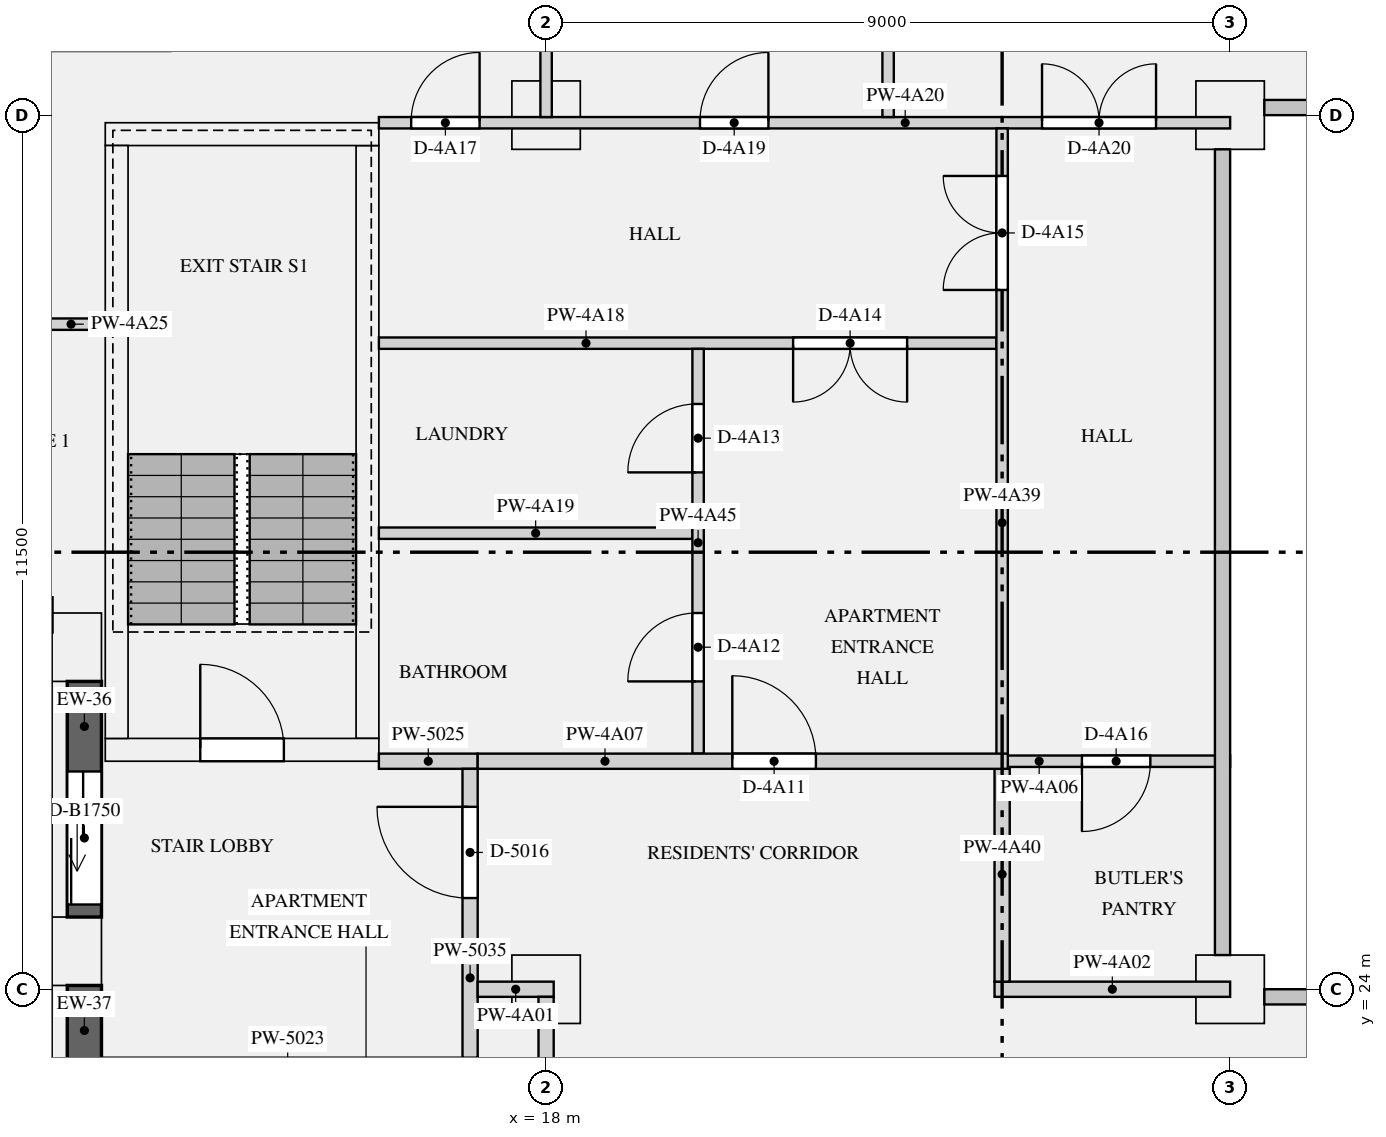
"""IFC4 building model, lengths in metres.
Left out: names, types, materials, properties, quantities, classifications, styles, units other than length and angle.
Written with IfcOpenShell. Run it as: python <this file> out.ifc"""

import sys

from ifc_helpers import new_model, si_unit, direction, frame, frame_2d, origin, origin_2d, place, context, subcontext, project, spatial, rectangle, extrude, element, fill, save


model = new_model("IFC4")
c1 = context("Model", 3, precision=1e-05, world=origin(), true_north=direction((0.0, 1.0)))
c2 = subcontext(c1, "Body", "Model", "MODEL_VIEW")
j1 = project(units=[si_unit("LENGTHUNIT", "METRE"), si_unit("PLANEANGLEUNIT", "RADIAN")], contexts=[c1])
p1 = place(None, origin())
s1 = spatial("IfcSite", under=j1, at=p1, CompositionType="ELEMENT")
p2 = place(p1, origin())
s2 = spatial("IfcBuilding", under=s1, at=p2, CompositionType="ELEMENT")
p3 = place(p2, frame((0.0, 0.0, 198.0)))
s3 = spatial("IfcBuildingStorey", under=s2, at=p3, CompositionType="ELEMENT", Elevation=198.0)
for number, where, z_axis, x_axis in (
    (1, (11.825, 28.5, 0.0), (0.0, 0.0, 1.0), (0.0, -1.0, 0.0)),
    (2, (11.825, 24.5, 0.0), (0.0, 0.0, 1.0), (0.0, -1.0, 0.0)),
):
    element("IfcColumn", number, at=place(p3, frame(where, z_axis=z_axis, x_axis=x_axis)), inside=s3, PredefinedType="USERDEFINED", context=c2, shape_type="SweptSolid", body=[
        extrude(rectangle(XDim=0.9, YDim=0.65, at=origin_2d()), origin(), (0.0, 0.0, 1.0), 3.15),
    ])
for number, where, z_axis, x_axis in (
    (3, (18.0, 24.0, 0.0), (0.0, 0.0, 1.0), (1.0, 0.0, 0.0)),
    (4, (27.0, 24.0, 0.0), (0.0, 0.0, 1.0), (1.0, 0.0, 0.0)),
    (5, (18.0, 35.5, 0.0), (0.0, 0.0, 1.0), (1.0, 0.0, 0.0)),
    (6, (27.0, 35.5, 0.0), (0.0, 0.0, 1.0), (1.0, 0.0, 0.0)),
):
    element("IfcColumn", number, at=place(p3, frame(where, z_axis=z_axis, x_axis=x_axis)), inside=s3, PredefinedType="COLUMN", context=c2, shape_type="SweptSolid", body=[
        extrude(rectangle(XDim=0.9, YDim=0.9, at=origin_2d()), origin(), (0.0, 0.0, 1.0), 3.15),
    ])
p4 = place(p3, frame((12.2, 27.15, 0.0), z_axis=(0.0, 0.0, 1.0), x_axis=(1.0, 0.0, 0.0)))
e7 = element("IfcWall", 7, at=p4, inside=s3, PredefinedType="SHEAR", context=c2, shape_type="SweptSolid", body=[
    extrude(rectangle(XDim=3.6, YDim=0.3, at=frame_2d((1.8, 0.0))), origin(), (0.0, 0.0, 1.0), 3.15),
])
p5 = place(p4, frame((1.25, 0.0, 0.0)))
e8 = element("IfcOpeningElement", 8, at=p5, cuts=e7, PredefinedType="OPENING", context=c2, shape_type="SweptSolid", body=[
    extrude(rectangle(XDim=1.1, YDim=2.1, at=frame_2d((0.55, 1.05))), frame((0.0, 0.16, 0.0), z_axis=(0.0, -1.0, 0.0), x_axis=(1.0, 0.0, 0.0)), (0.0, 0.0, 1.0), 0.32),
])
p6 = place(p3, frame((12.2, 35.25, 0.0), z_axis=(0.0, 0.0, 1.0), x_axis=(1.0, 0.0, 0.0)))
e9 = element("IfcWall", 9, at=p6, inside=s3, PredefinedType="SHEAR", context=c2, shape_type="SweptSolid", body=[
    extrude(rectangle(XDim=3.6, YDim=0.3, at=frame_2d((1.8, 0.0))), origin(), (0.0, 0.0, 1.0), 3.15),
])
for number, where, z_axis, x_axis in (
    (10, (12.35, 27.3, 0.0), (0.0, 0.0, 1.0), (0.0, 1.0, 0.0)),
    (11, (15.65, 27.3, 0.0), (0.0, 0.0, 1.0), (0.0, 1.0, 0.0)),
):
    element("IfcWall", number, at=place(p3, frame(where, z_axis=z_axis, x_axis=x_axis)), inside=s3, PredefinedType="SHEAR", context=c2, shape_type="SweptSolid", body=[
        extrude(rectangle(XDim=7.8, YDim=0.3, at=frame_2d((3.9, 0.0))), origin(), (0.0, 0.0, 1.0), 3.15),
    ])
p7 = place(p3, frame((11.925, 28.05, 0.0), z_axis=(0.0, 0.0, 1.0), x_axis=(0.0, -1.0, 0.0)))
e12 = element("IfcWall", 12, at=p7, inside=s3, PredefinedType="SOLIDWALL", context=c2, shape_type="SweptSolid", body=[
    extrude(rectangle(XDim=3.1, YDim=0.45, at=frame_2d((1.55, 0.0))), origin(), (0.0, 0.0, 1.0), 2.83),
])
p8 = place(p7, frame((1.185, 0.0, 0.0)))
e13 = element("IfcOpeningElement", 13, at=p8, cuts=e12, PredefinedType="OPENING", context=c2, shape_type="SweptSolid", body=[
    extrude(rectangle(XDim=1.75, YDim=2.3, at=frame_2d((0.875, 1.15))), frame((0.0, 0.235, 0.0), z_axis=(0.0, -1.0, 0.0), x_axis=(1.0, 0.0, 0.0)), (0.0, 0.0, 1.0), 0.47),
])
p9 = place(p3, frame((11.925, 24.05, 0.0), z_axis=(0.0, 0.0, 1.0), x_axis=(0.0, -1.0, 0.0)))
e14 = element("IfcWall", 14, at=p9, inside=s3, PredefinedType="SOLIDWALL", context=c2, shape_type="SweptSolid", body=[
    extrude(rectangle(XDim=3.1, YDim=0.45, at=frame_2d((1.55, 0.0))), origin(), (0.0, 0.0, 1.0), 2.83),
])
p10 = place(p9, frame((1.185, 0.0, 0.0)))
e15 = element("IfcOpeningElement", 15, at=p10, cuts=e14, PredefinedType="OPENING", context=c2, shape_type="SweptSolid", body=[
    extrude(rectangle(XDim=1.75, YDim=2.3, at=frame_2d((0.875, 1.15))), frame((0.0, 0.235, 0.0), z_axis=(0.0, -1.0, 0.0), x_axis=(1.0, 0.0, 0.0)), (0.0, 0.0, 1.0), 0.47),
])
p11 = place(p3, frame((15.8, 27.0, 0.0), z_axis=(0.0, 0.0, 1.0), x_axis=(1.0, 0.0, 0.0)))
e16 = element("IfcWall", 16, at=p11, inside=s3, PredefinedType="PARTITIONING", context=c2, shape_type="SweptSolid", body=[
    extrude(rectangle(XDim=1.3, YDim=0.2, at=frame_2d((0.65, 0.0))), origin(), (0.0, 0.0, 1.0), 2.83),
])
p12 = place(p3, frame((17.0, 23.1, 0.0), z_axis=(0.0, 0.0, 1.0), x_axis=(0.0, 1.0, 0.0)))
e17 = element("IfcWall", 17, at=p12, inside=s3, PredefinedType="PARTITIONING", context=c2, shape_type="SweptSolid", body=[
    extrude(rectangle(XDim=3.8, YDim=0.2, at=frame_2d((1.9, 0.0))), origin(), (0.0, 0.0, 1.0), 2.83),
])
p13 = place(p12, frame((2.1, 0.0, 0.0)))
e18 = element("IfcOpeningElement", 18, at=p13, cuts=e17, PredefinedType="OPENING", context=c2, shape_type="SweptSolid", body=[
    extrude(rectangle(XDim=1.2, YDim=2.1, at=frame_2d((0.6, 1.05))), frame((0.0, 0.11, 0.0), z_axis=(0.0, -1.0, 0.0), x_axis=(1.0, 0.0, 0.0)), (0.0, 0.0, 1.0), 0.22),
])
p14 = place(p3, frame((17.1, 24.0, 0.0), z_axis=(0.0, 0.0, 1.0), x_axis=(1.0, 0.0, 0.0)))
e19 = element("IfcWall", 19, at=p14, inside=s3, PredefinedType="PARTITIONING", context=c2, shape_type="SweptSolid", body=[
    extrude(rectangle(XDim=1.0, YDim=0.2, at=frame_2d((0.5, 0.0))), origin(), (0.0, 0.0, 1.0), 2.83),
])
p15 = place(p3, frame((23.9, 24.0, 0.0), z_axis=(0.0, 0.0, 1.0), x_axis=(1.0, 0.0, 0.0)))
e20 = element("IfcWall", 20, at=p15, inside=s3, PredefinedType="PARTITIONING", context=c2, shape_type="SweptSolid", body=[
    extrude(rectangle(XDim=3.1, YDim=0.2, at=frame_2d((1.55, 0.0))), origin(), (0.0, 0.0, 1.0), 2.83),
])
p16 = place(p3, frame((23.925, 27.0, 0.0), z_axis=(0.0, 0.0, 1.0), x_axis=(1.0, 0.0, 0.0)))
e21 = element("IfcWall", 21, at=p16, inside=s3, PredefinedType="PARTITIONING", context=c2, shape_type="SweptSolid", body=[
    extrude(rectangle(XDim=3.075, YDim=0.15, at=frame_2d((1.538, 0.0))), origin(), (0.0, 0.0, 1.0), 2.83),
])
p17 = place(p16, frame((1.125, 0.0, 0.0)))
e22 = element("IfcOpeningElement", 22, at=p17, cuts=e21, PredefinedType="OPENING", context=c2, shape_type="SweptSolid", body=[
    extrude(rectangle(XDim=0.9, YDim=2.1, at=frame_2d((0.45, 1.05))), frame((0.0, 0.085, 0.0), z_axis=(0.0, -1.0, 0.0), x_axis=(1.0, 0.0, 0.0)), (0.0, 0.0, 1.0), 0.17),
])
p18 = place(p3, frame((17.1, 27.0, 0.0), z_axis=(0.0, 0.0, 1.0), x_axis=(1.0, 0.0, 0.0)))
e23 = element("IfcWall", 23, at=p18, inside=s3, PredefinedType="PARTITIONING", context=c2, shape_type="SweptSolid", body=[
    extrude(rectangle(XDim=6.975, YDim=0.2, at=frame_2d((3.487, 0.0))), origin(), (0.0, 0.0, 1.0), 2.83),
])
p19 = place(p18, frame((3.35, 0.0, 0.0)))
e24 = element("IfcOpeningElement", 24, at=p19, cuts=e23, PredefinedType="OPENING", context=c2, shape_type="SweptSolid", body=[
    extrude(rectangle(XDim=1.1, YDim=2.1, at=frame_2d((0.55, 1.05))), frame((0.0, 0.11, 0.0), z_axis=(0.0, -1.0, 0.0), x_axis=(1.0, 0.0, 0.0)), (0.0, 0.0, 1.0), 0.22),
])
p20 = place(p3, frame((15.8, 32.5, 0.0), z_axis=(0.0, 0.0, 1.0), x_axis=(1.0, 0.0, 0.0)))
e25 = element("IfcWall", 25, at=p20, inside=s3, PredefinedType="PARTITIONING", context=c2, shape_type="SweptSolid", body=[
    extrude(rectangle(XDim=8.125, YDim=0.15, at=frame_2d((4.062, 0.0))), origin(), (0.0, 0.0, 1.0), 2.83),
])
p21 = place(p20, frame((5.45, 0.0, 0.0)))
e26 = element("IfcOpeningElement", 26, at=p21, cuts=e25, PredefinedType="OPENING", context=c2, shape_type="SweptSolid", body=[
    extrude(rectangle(XDim=1.5, YDim=2.1, at=frame_2d((0.75, 1.05))), frame((0.0, 0.085, 0.0), z_axis=(0.0, -1.0, 0.0), x_axis=(1.0, 0.0, 0.0)), (0.0, 0.0, 1.0), 0.17),
])
p22 = place(p3, frame((15.8, 30.0, 0.0), z_axis=(0.0, 0.0, 1.0), x_axis=(1.0, 0.0, 0.0)))
e27 = element("IfcWall", 27, at=p22, inside=s3, PredefinedType="PARTITIONING", context=c2, shape_type="SweptSolid", body=[
    extrude(rectangle(XDim=4.125, YDim=0.15, at=frame_2d((2.062, 0.0))), origin(), (0.0, 0.0, 1.0), 2.83),
])
p23 = place(p3, frame((15.8, 35.4, 0.0), z_axis=(0.0, 0.0, 1.0), x_axis=(1.0, 0.0, 0.0)))
e28 = element("IfcWall", 28, at=p23, inside=s3, PredefinedType="PARTITIONING", context=c2, shape_type="SweptSolid", body=[
    extrude(rectangle(XDim=11.2, YDim=0.15, at=frame_2d((5.6, 0.0))), origin(), (0.0, 0.0, 1.0), 2.83),
])
p24 = place(p23, frame((0.425, 0.0, 0.0)))
e29 = element("IfcOpeningElement", 29, at=p24, cuts=e28, PredefinedType="OPENING", context=c2, shape_type="SweptSolid", body=[
    extrude(rectangle(XDim=0.9, YDim=2.1, at=frame_2d((0.45, 1.05))), frame((0.0, 0.085, 0.0), z_axis=(0.0, -1.0, 0.0), x_axis=(1.0, 0.0, 0.0)), (0.0, 0.0, 1.0), 0.17),
])
p25 = place(p23, frame((4.225, 0.0, 0.0)))
e30 = element("IfcOpeningElement", 30, at=p25, cuts=e28, PredefinedType="OPENING", context=c2, shape_type="SweptSolid", body=[
    extrude(rectangle(XDim=0.9, YDim=2.1, at=frame_2d((0.45, 1.05))), frame((0.0, 0.085, 0.0), z_axis=(0.0, -1.0, 0.0), x_axis=(1.0, 0.0, 0.0)), (0.0, 0.0, 1.0), 0.17),
])
p26 = place(p23, frame((8.725, 0.0, 0.0)))
e31 = element("IfcOpeningElement", 31, at=p26, cuts=e28, PredefinedType="OPENING", context=c2, shape_type="SweptSolid", body=[
    extrude(rectangle(XDim=1.5, YDim=2.1, at=frame_2d((0.75, 1.05))), frame((0.0, 0.085, 0.0), z_axis=(0.0, -1.0, 0.0), x_axis=(1.0, 0.0, 0.0)), (0.0, 0.0, 1.0), 0.17),
])
p27 = place(p3, frame((9.65, 32.75, 0.0), z_axis=(0.0, 0.0, 1.0), x_axis=(1.0, 0.0, 0.0)))
e32 = element("IfcWall", 32, at=p27, inside=s3, PredefinedType="PARTITIONING", context=c2, shape_type="SweptSolid", body=[
    extrude(rectangle(XDim=2.55, YDim=0.15, at=frame_2d((1.275, 0.0))), origin(), (0.0, 0.0, 1.0), 2.83),
])
p28 = place(p27, frame((0.75, 0.0, 0.0)))
e33 = element("IfcOpeningElement", 33, at=p28, cuts=e32, PredefinedType="OPENING", context=c2, shape_type="SweptSolid", body=[
    extrude(rectangle(XDim=0.9, YDim=2.1, at=frame_2d((0.45, 1.05))), frame((0.0, 0.085, 0.0), z_axis=(0.0, -1.0, 0.0), x_axis=(1.0, 0.0, 0.0)), (0.0, 0.0, 1.0), 0.17),
])
p29 = place(p3, frame((18.0, 35.475, 0.0), z_axis=(0.0, 0.0, 1.0), x_axis=(0.0, 1.0, 0.0)))
e34 = element("IfcWall", 34, at=p29, inside=s3, PredefinedType="PARTITIONING", context=c2, shape_type="SweptSolid", body=[
    extrude(rectangle(XDim=5.375, YDim=0.15, at=frame_2d((2.688, 0.0))), origin(), (0.0, 0.0, 1.0), 2.83),
])
p30 = place(p3, frame((18.0, 16.1, 0.0), z_axis=(0.0, 0.0, 1.0), x_axis=(0.0, 1.0, 0.0)))
e35 = element("IfcWall", 35, at=p30, inside=s3, PredefinedType="PARTITIONING", context=c2, shape_type="SweptSolid", body=[
    extrude(rectangle(XDim=7.8, YDim=0.2, at=frame_2d((3.9, 0.0))), origin(), (0.0, 0.0, 1.0), 2.83),
])
p31 = place(p30, frame((5.35, 0.0, 0.0)))
e36 = element("IfcOpeningElement", 36, at=p31, cuts=e35, PredefinedType="OPENING", context=c2, shape_type="SweptSolid", body=[
    extrude(rectangle(XDim=1.1, YDim=2.1, at=frame_2d((0.55, 1.05))), frame((0.0, 0.11, 0.0), z_axis=(0.0, -1.0, 0.0), x_axis=(1.0, 0.0, 0.0)), (0.0, 0.0, 1.0), 0.22),
])
p32 = place(p3, frame((24.0, 27.075, 0.0), z_axis=(0.0, 0.0, 1.0), x_axis=(0.0, 1.0, 0.0)))
e37 = element("IfcWall", 37, at=p32, inside=s3, PredefinedType="PARTITIONING", context=c2, shape_type="SweptSolid", body=[
    extrude(rectangle(XDim=8.25, YDim=0.15, at=frame_2d((4.125, 0.0))), origin(), (0.0, 0.0, 1.0), 2.83),
])
p33 = place(p32, frame((6.125, 0.0, 0.0)))
e38 = element("IfcOpeningElement", 38, at=p33, cuts=e37, PredefinedType="OPENING", context=c2, shape_type="SweptSolid", body=[
    extrude(rectangle(XDim=1.5, YDim=2.1, at=frame_2d((0.75, 1.05))), frame((0.0, 0.085, 0.0), z_axis=(0.0, -1.0, 0.0), x_axis=(1.0, 0.0, 0.0)), (0.0, 0.0, 1.0), 0.17),
])
p34 = place(p3, frame((24.0, 24.1, 0.0), z_axis=(0.0, 0.0, 1.0), x_axis=(0.0, 1.0, 0.0)))
e39 = element("IfcWall", 39, at=p34, inside=s3, PredefinedType="PARTITIONING", context=c2, shape_type="SweptSolid", body=[
    extrude(rectangle(XDim=2.825, YDim=0.2, at=frame_2d((1.413, 0.0))), origin(), (0.0, 0.0, 1.0), 2.83),
])
p35 = place(p3, frame((20.0, 27.1, 0.0), z_axis=(0.0, 0.0, 1.0), x_axis=(0.0, 1.0, 0.0)))
e40 = element("IfcWall", 40, at=p35, inside=s3, PredefinedType="PARTITIONING", context=c2, shape_type="SweptSolid", body=[
    extrude(rectangle(XDim=5.325, YDim=0.15, at=frame_2d((2.663, 0.0))), origin(), (0.0, 0.0, 1.0), 2.83),
])
p36 = place(p35, frame((0.95, 0.0, 0.0)))
e41 = element("IfcOpeningElement", 41, at=p36, cuts=e40, PredefinedType="OPENING", context=c2, shape_type="SweptSolid", body=[
    extrude(rectangle(XDim=0.9, YDim=2.1, at=frame_2d((0.45, 1.05))), frame((0.0, 0.085, 0.0), z_axis=(0.0, -1.0, 0.0), x_axis=(1.0, 0.0, 0.0)), (0.0, 0.0, 1.0), 0.17),
])
p37 = place(p35, frame((3.7, 0.0, 0.0)))
e42 = element("IfcOpeningElement", 42, at=p37, cuts=e40, PredefinedType="OPENING", context=c2, shape_type="SweptSolid", body=[
    extrude(rectangle(XDim=0.9, YDim=2.1, at=frame_2d((0.45, 1.05))), frame((0.0, 0.085, 0.0), z_axis=(0.0, -1.0, 0.0), x_axis=(1.0, 0.0, 0.0)), (0.0, 0.0, 1.0), 0.17),
])
p38 = place(p3, frame((22.5, 35.475, 0.0), z_axis=(0.0, 0.0, 1.0), x_axis=(0.0, 1.0, 0.0)))
e43 = element("IfcWall", 43, at=p38, inside=s3, PredefinedType="PARTITIONING", context=c2, shape_type="SweptSolid", body=[
    extrude(rectangle(XDim=5.375, YDim=0.15, at=frame_2d((2.688, 0.0))), origin(), (0.0, 0.0, 1.0), 2.83),
])
p39 = place(p8, frame((1.75, -0.19, 0.0), z_axis=(0.0, 0.0, 1.0), x_axis=(-1.0, 0.0, 0.0)))
e44 = element("IfcDoor", 44, at=p39, inside=s3, OperationType="SLIDING_TO_LEFT", PredefinedType="DOOR", context=c2, shape_type="SweptSolid", body=[
    extrude(rectangle(XDim=1.75, YDim=2.3, at=frame_2d((0.875, 1.15))), frame((0.0, -0.07, 0.0), z_axis=(0.0, -1.0, 0.0), x_axis=(1.0, 0.0, 0.0)), (0.0, 0.0, 1.0), 0.05),
])
fill(e13, e44)
p40 = place(p5, origin())
e45 = element("IfcDoor", 45, at=p40, inside=s3, OperationType="SINGLE_SWING_LEFT", PredefinedType="DOOR", context=c2, shape_type="SweptSolid", body=[
    extrude(rectangle(XDim=1.1, YDim=2.1, at=frame_2d((0.55, 1.05))), frame((0.0, 0.025, 0.0), z_axis=(0.0, -1.0, 0.0), x_axis=(1.0, 0.0, 0.0)), (0.0, 0.0, 1.0), 0.05),
])
fill(e8, e45)
p41 = place(p13, origin())
e46 = element("IfcDoor", 46, at=p41, inside=s3, OperationType="SINGLE_SWING_RIGHT", PredefinedType="DOOR", context=c2, shape_type="SweptSolid", body=[
    extrude(rectangle(XDim=1.2, YDim=2.1, at=frame_2d((0.6, 1.05))), frame((0.0, 0.025, 0.0), z_axis=(0.0, -1.0, 0.0), x_axis=(1.0, 0.0, 0.0)), (0.0, 0.0, 1.0), 0.05),
])
fill(e18, e46)
p42 = place(p19, origin())
e47 = element("IfcDoor", 47, at=p42, inside=s3, OperationType="SINGLE_SWING_LEFT", PredefinedType="DOOR", context=c2, shape_type="SweptSolid", body=[
    extrude(rectangle(XDim=1.1, YDim=2.1, at=frame_2d((0.55, 1.05))), frame((0.0, 0.025, 0.0), z_axis=(0.0, -1.0, 0.0), x_axis=(1.0, 0.0, 0.0)), (0.0, 0.0, 1.0), 0.05),
])
fill(e24, e47)
p43 = place(p36, origin())
e48 = element("IfcDoor", 48, at=p43, inside=s3, OperationType="SINGLE_SWING_LEFT", PredefinedType="DOOR", context=c2, shape_type="SweptSolid", body=[
    extrude(rectangle(XDim=0.9, YDim=2.1, at=frame_2d((0.45, 1.05))), frame((0.0, 0.025, 0.0), z_axis=(0.0, -1.0, 0.0), x_axis=(1.0, 0.0, 0.0)), (0.0, 0.0, 1.0), 0.05),
])
fill(e41, e48)
p44 = place(p37, origin())
e49 = element("IfcDoor", 49, at=p44, inside=s3, OperationType="SINGLE_SWING_LEFT", PredefinedType="DOOR", context=c2, shape_type="SweptSolid", body=[
    extrude(rectangle(XDim=0.9, YDim=2.1, at=frame_2d((0.45, 1.05))), frame((0.0, 0.025, 0.0), z_axis=(0.0, -1.0, 0.0), x_axis=(1.0, 0.0, 0.0)), (0.0, 0.0, 1.0), 0.05),
])
fill(e42, e49)
p45 = place(p21, frame((1.5, 0.0, 0.0), z_axis=(0.0, 0.0, 1.0), x_axis=(-1.0, 0.0, 0.0)))
e50 = element("IfcDoor", 50, at=p45, inside=s3, OperationType="DOUBLE_DOOR_SINGLE_SWING", PredefinedType="DOOR", context=c2, shape_type="SweptSolid", body=[
    extrude(rectangle(XDim=1.5, YDim=2.1, at=frame_2d((0.75, 1.05))), frame((0.0, 0.025, 0.0), z_axis=(0.0, -1.0, 0.0), x_axis=(1.0, 0.0, 0.0)), (0.0, 0.0, 1.0), 0.05),
])
fill(e26, e50)
p46 = place(p33, origin())
e51 = element("IfcDoor", 51, at=p46, inside=s3, OperationType="DOUBLE_DOOR_SINGLE_SWING", PredefinedType="DOOR", context=c2, shape_type="SweptSolid", body=[
    extrude(rectangle(XDim=1.5, YDim=2.1, at=frame_2d((0.75, 1.05))), frame((0.0, 0.025, 0.0), z_axis=(0.0, -1.0, 0.0), x_axis=(1.0, 0.0, 0.0)), (0.0, 0.0, 1.0), 0.05),
])
fill(e38, e51)
p47 = place(p17, frame((0.9, 0.0, 0.0), z_axis=(0.0, 0.0, 1.0), x_axis=(-1.0, 0.0, 0.0)))
e52 = element("IfcDoor", 52, at=p47, inside=s3, OperationType="SINGLE_SWING_RIGHT", PredefinedType="DOOR", context=c2, shape_type="SweptSolid", body=[
    extrude(rectangle(XDim=0.9, YDim=2.1, at=frame_2d((0.45, 1.05))), frame((0.0, 0.025, 0.0), z_axis=(0.0, -1.0, 0.0), x_axis=(1.0, 0.0, 0.0)), (0.0, 0.0, 1.0), 0.05),
])
fill(e22, e52)
p48 = place(p24, origin())
e53 = element("IfcDoor", 53, at=p48, inside=s3, OperationType="SINGLE_SWING_RIGHT", PredefinedType="DOOR", context=c2, shape_type="SweptSolid", body=[
    extrude(rectangle(XDim=0.9, YDim=2.1, at=frame_2d((0.45, 1.05))), frame((0.0, 0.025, 0.0), z_axis=(0.0, -1.0, 0.0), x_axis=(1.0, 0.0, 0.0)), (0.0, 0.0, 1.0), 0.05),
])
fill(e29, e53)
p49 = place(p25, origin())
e54 = element("IfcDoor", 54, at=p49, inside=s3, OperationType="SINGLE_SWING_RIGHT", PredefinedType="DOOR", context=c2, shape_type="SweptSolid", body=[
    extrude(rectangle(XDim=0.9, YDim=2.1, at=frame_2d((0.45, 1.05))), frame((0.0, 0.025, 0.0), z_axis=(0.0, -1.0, 0.0), x_axis=(1.0, 0.0, 0.0)), (0.0, 0.0, 1.0), 0.05),
])
fill(e30, e54)
p50 = place(p26, origin())
e55 = element("IfcDoor", 55, at=p50, inside=s3, OperationType="DOUBLE_DOOR_SINGLE_SWING", PredefinedType="DOOR", context=c2, shape_type="SweptSolid", body=[
    extrude(rectangle(XDim=1.5, YDim=2.1, at=frame_2d((0.75, 1.05))), frame((0.0, 0.025, 0.0), z_axis=(0.0, -1.0, 0.0), x_axis=(1.0, 0.0, 0.0)), (0.0, 0.0, 1.0), 0.05),
])
fill(e31, e55)
save(model, sys.argv[1])
